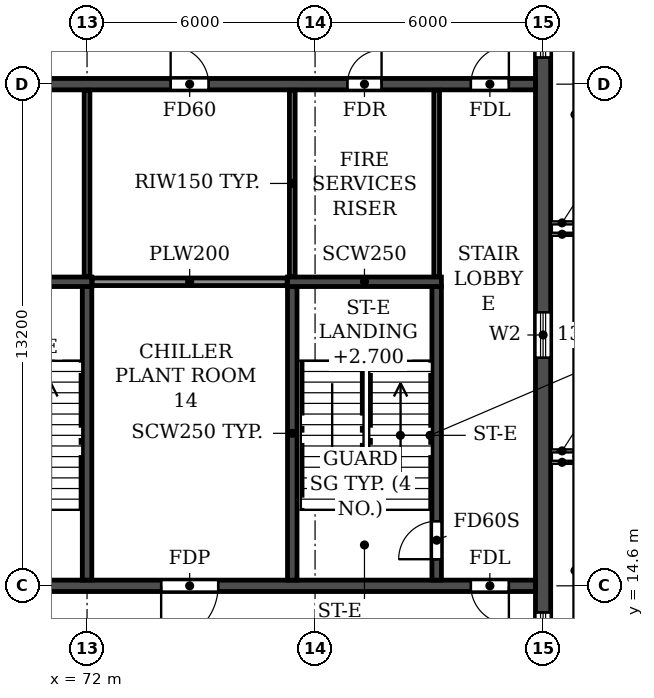
"""IFC4 building model, lengths in metres.
Left out: names, types, materials, properties, quantities, classifications, styles, units other than length and angle.
Written with IfcOpenShell. Run it as: python <this file> out.ifc"""

import sys

from ifc_helpers import new_model, si_unit, direction, frame, frame_2d, origin, place, context, subcontext, project, spatial, rectangle, extrude, element, fill, save


model = new_model("IFC4")
c1 = context("Model", 3, precision=1e-05, world=origin(), true_north=direction((0.0, 1.0)))
c2 = subcontext(c1, "Body", "Model", "MODEL_VIEW")
j1 = project(units=[si_unit("LENGTHUNIT", "METRE"), si_unit("PLANEANGLEUNIT", "RADIAN")], contexts=[c1])
p1 = place(None, origin())
s1 = spatial("IfcSite", under=j1, at=p1, CompositionType="ELEMENT")
p2 = place(p1, origin())
s2 = spatial("IfcBuilding", under=s1, at=p2, CompositionType="ELEMENT")
p3 = place(p2, frame((0.0, 0.0, 267.0)))
s3 = spatial("IfcBuildingStorey", under=s2, at=p3, CompositionType="ELEMENT", Elevation=267.0)
p4 = place(p3, frame((84.0, 4.683, 0.0), z_axis=(0.0, 0.0, 1.0), x_axis=(0.0, 1.0, 0.0)))
e1 = element("IfcWall", 1, at=p4, inside=s3, PredefinedType="SHEAR", context=c2, shape_type="SweptSolid", body=[
    extrude(rectangle(XDim=31.834, YDim=0.4, at=frame_2d((15.917, 0.0))), origin(), (0.0, 0.0, 1.0), 5.15),
])
p5 = place(p4, frame((23.817, 0.0, 0.9)))
e2 = element("IfcOpeningElement", 2, at=p5, cuts=e1, PredefinedType="OPENING", context=c2, shape_type="SweptSolid", body=[
    extrude(rectangle(XDim=1.2, YDim=1.5, at=frame_2d((0.6, 0.75))), frame((0.0, 0.21, 0.0), z_axis=(0.0, -1.0, 0.0), x_axis=(1.0, 0.0, 0.0)), (0.0, 0.0, 1.0), 0.42),
])
p6 = place(p4, frame((8.017, 0.0, 0.9)))
e3 = element("IfcOpeningElement", 3, at=p6, cuts=e1, PredefinedType="OPENING", context=c2, shape_type="SweptSolid", body=[
    extrude(rectangle(XDim=1.2, YDim=1.5, at=frame_2d((0.6, 0.75))), frame((0.0, 0.21, 0.0), z_axis=(0.0, -1.0, 0.0), x_axis=(1.0, 0.0, 0.0)), (0.0, 0.0, 1.0), 0.42),
])
p7 = place(p4, frame((15.917, 0.0, 0.9)))
e4 = element("IfcOpeningElement", 4, at=p7, cuts=e1, PredefinedType="OPENING", context=c2, shape_type="SweptSolid", body=[
    extrude(rectangle(XDim=1.2, YDim=1.5, at=frame_2d((0.6, 0.75))), frame((0.0, 0.21, 0.0), z_axis=(0.0, -1.0, 0.0), x_axis=(1.0, 0.0, 0.0)), (0.0, 0.0, 1.0), 0.42),
])
p8 = place(p3, frame((18.2, 14.6, 0.0), z_axis=(0.0, 0.0, 1.0), x_axis=(1.0, 0.0, 0.0)))
e5 = element("IfcWall", 5, at=p8, inside=s3, PredefinedType="SOLIDWALL", context=c2, shape_type="SweptSolid", body=[
    extrude(rectangle(XDim=65.6, YDim=0.3, at=frame_2d((32.8, 0.0))), origin(), (0.0, 0.0, 1.0), 5.15),
])
p9 = place(p8, frame((0.7, 0.0, 0.0)))
e6 = element("IfcOpeningElement", 6, at=p9, cuts=e5, PredefinedType="OPENING", context=c2, shape_type="SweptSolid", body=[
    extrude(rectangle(XDim=1.0, YDim=2.1, at=frame_2d((0.5, 1.05))), frame((0.0, 0.16, 0.0), z_axis=(0.0, -1.0, 0.0), x_axis=(1.0, 0.0, 0.0)), (0.0, 0.0, 1.0), 0.32),
])
p10 = place(p8, frame((8.35, 0.0, 0.0)))
e7 = element("IfcOpeningElement", 7, at=p10, cuts=e5, PredefinedType="OPENING", context=c2, shape_type="SweptSolid", body=[
    extrude(rectangle(XDim=1.5, YDim=2.1, at=frame_2d((0.75, 1.05))), frame((0.0, 0.16, 0.0), z_axis=(0.0, -1.0, 0.0), x_axis=(1.0, 0.0, 0.0)), (0.0, 0.0, 1.0), 0.32),
])
p11 = place(p8, frame((13.2, 0.0, 0.0)))
e8 = element("IfcOpeningElement", 8, at=p11, cuts=e5, PredefinedType="OPENING", context=c2, shape_type="SweptSolid", body=[
    extrude(rectangle(XDim=1.0, YDim=2.1, at=frame_2d((0.5, 1.05))), frame((0.0, 0.16, 0.0), z_axis=(0.0, -1.0, 0.0), x_axis=(1.0, 0.0, 0.0)), (0.0, 0.0, 1.0), 0.32),
])
p12 = place(p8, frame((27.1, 0.0, 0.0)))
e9 = element("IfcOpeningElement", 9, at=p12, cuts=e5, PredefinedType="OPENING", context=c2, shape_type="SweptSolid", body=[
    extrude(rectangle(XDim=1.0, YDim=2.1, at=frame_2d((0.5, 1.05))), frame((0.0, 0.16, 0.0), z_axis=(0.0, -1.0, 0.0), x_axis=(1.0, 0.0, 0.0)), (0.0, 0.0, 1.0), 0.32),
])
p13 = place(p8, frame((32.3, 0.0, 0.0)))
e10 = element("IfcOpeningElement", 10, at=p13, cuts=e5, PredefinedType="OPENING", context=c2, shape_type="SweptSolid", body=[
    extrude(rectangle(XDim=1.0, YDim=2.1, at=frame_2d((0.5, 1.05))), frame((0.0, 0.16, 0.0), z_axis=(0.0, -1.0, 0.0), x_axis=(1.0, 0.0, 0.0)), (0.0, 0.0, 1.0), 0.32),
])
p14 = place(p8, frame((34.9, 0.0, 0.0)))
e11 = element("IfcOpeningElement", 11, at=p14, cuts=e5, PredefinedType="OPENING", context=c2, shape_type="SweptSolid", body=[
    extrude(rectangle(XDim=1.0, YDim=2.1, at=frame_2d((0.5, 1.05))), frame((0.0, 0.16, 0.0), z_axis=(0.0, -1.0, 0.0), x_axis=(1.0, 0.0, 0.0)), (0.0, 0.0, 1.0), 0.32),
])
p15 = place(p8, frame((38.8, 0.0, 0.0)))
e12 = element("IfcOpeningElement", 12, at=p15, cuts=e5, PredefinedType="OPENING", context=c2, shape_type="SweptSolid", body=[
    extrude(rectangle(XDim=1.0, YDim=2.1, at=frame_2d((0.5, 1.05))), frame((0.0, 0.16, 0.0), z_axis=(0.0, -1.0, 0.0), x_axis=(1.0, 0.0, 0.0)), (0.0, 0.0, 1.0), 0.32),
])
p16 = place(p8, frame((51.4, 0.0, 0.0)))
e13 = element("IfcOpeningElement", 13, at=p16, cuts=e5, PredefinedType="OPENING", context=c2, shape_type="SweptSolid", body=[
    extrude(rectangle(XDim=1.0, YDim=2.1, at=frame_2d((0.5, 1.05))), frame((0.0, 0.16, 0.0), z_axis=(0.0, -1.0, 0.0), x_axis=(1.0, 0.0, 0.0)), (0.0, 0.0, 1.0), 0.32),
])
p17 = place(p8, frame((55.75, 0.0, 0.0)))
e14 = element("IfcOpeningElement", 14, at=p17, cuts=e5, PredefinedType="OPENING", context=c2, shape_type="SweptSolid", body=[
    extrude(rectangle(XDim=1.5, YDim=2.1, at=frame_2d((0.75, 1.05))), frame((0.0, 0.16, 0.0), z_axis=(0.0, -1.0, 0.0), x_axis=(1.0, 0.0, 0.0)), (0.0, 0.0, 1.0), 0.32),
])
p18 = place(p8, frame((63.9, 0.0, 0.0)))
e15 = element("IfcOpeningElement", 15, at=p18, cuts=e5, PredefinedType="OPENING", context=c2, shape_type="SweptSolid", body=[
    extrude(rectangle(XDim=1.0, YDim=2.1, at=frame_2d((0.5, 1.05))), frame((0.0, 0.16, 0.0), z_axis=(0.0, -1.0, 0.0), x_axis=(1.0, 0.0, 0.0)), (0.0, 0.0, 1.0), 0.32),
])
p19 = place(p3, frame((18.2, 27.8, 0.0), z_axis=(0.0, 0.0, 1.0), x_axis=(1.0, 0.0, 0.0)))
e16 = element("IfcWall", 16, at=p19, inside=s3, PredefinedType="SOLIDWALL", context=c2, shape_type="SweptSolid", body=[
    extrude(rectangle(XDim=65.6, YDim=0.3, at=frame_2d((32.8, 0.0))), origin(), (0.0, 0.0, 1.0), 5.15),
])
p20 = place(p19, frame((0.7, 0.0, 0.0)))
e17 = element("IfcOpeningElement", 17, at=p20, cuts=e16, PredefinedType="OPENING", context=c2, shape_type="SweptSolid", body=[
    extrude(rectangle(XDim=1.0, YDim=2.1, at=frame_2d((0.5, 1.05))), frame((0.0, 0.16, 0.0), z_axis=(0.0, -1.0, 0.0), x_axis=(1.0, 0.0, 0.0)), (0.0, 0.0, 1.0), 0.32),
])
p21 = place(p19, frame((4.05, 0.0, 0.0)))
e18 = element("IfcOpeningElement", 18, at=p21, cuts=e16, PredefinedType="OPENING", context=c2, shape_type="SweptSolid", body=[
    extrude(rectangle(XDim=0.9, YDim=2.1, at=frame_2d((0.45, 1.05))), frame((0.0, 0.16, 0.0), z_axis=(0.0, -1.0, 0.0), x_axis=(1.0, 0.0, 0.0)), (0.0, 0.0, 1.0), 0.32),
])
p22 = place(p19, frame((8.6, 0.0, 0.0)))
e19 = element("IfcOpeningElement", 19, at=p22, cuts=e16, PredefinedType="OPENING", context=c2, shape_type="SweptSolid", body=[
    extrude(rectangle(XDim=1.0, YDim=2.1, at=frame_2d((0.5, 1.05))), frame((0.0, 0.16, 0.0), z_axis=(0.0, -1.0, 0.0), x_axis=(1.0, 0.0, 0.0)), (0.0, 0.0, 1.0), 0.32),
])
p23 = place(p19, frame((13.25, 0.0, 0.0)))
e20 = element("IfcOpeningElement", 20, at=p23, cuts=e16, PredefinedType="OPENING", context=c2, shape_type="SweptSolid", body=[
    extrude(rectangle(XDim=0.9, YDim=2.1, at=frame_2d((0.45, 1.05))), frame((0.0, 0.16, 0.0), z_axis=(0.0, -1.0, 0.0), x_axis=(1.0, 0.0, 0.0)), (0.0, 0.0, 1.0), 0.32),
])
p24 = place(p19, frame((17.7, 0.0, 0.0)))
e21 = element("IfcOpeningElement", 21, at=p24, cuts=e16, PredefinedType="OPENING", context=c2, shape_type="SweptSolid", body=[
    extrude(rectangle(XDim=1.0, YDim=2.1, at=frame_2d((0.5, 1.05))), frame((0.0, 0.16, 0.0), z_axis=(0.0, -1.0, 0.0), x_axis=(1.0, 0.0, 0.0)), (0.0, 0.0, 1.0), 0.32),
])
p25 = place(p19, frame((22.9, 0.0, 0.0)))
e22 = element("IfcOpeningElement", 22, at=p25, cuts=e16, PredefinedType="OPENING", context=c2, shape_type="SweptSolid", body=[
    extrude(rectangle(XDim=1.0, YDim=2.1, at=frame_2d((0.5, 1.05))), frame((0.0, 0.16, 0.0), z_axis=(0.0, -1.0, 0.0), x_axis=(1.0, 0.0, 0.0)), (0.0, 0.0, 1.0), 0.32),
])
p26 = place(p19, frame((29.4, 0.0, 0.0)))
e23 = element("IfcOpeningElement", 23, at=p26, cuts=e16, PredefinedType="OPENING", context=c2, shape_type="SweptSolid", body=[
    extrude(rectangle(XDim=1.0, YDim=2.1, at=frame_2d((0.5, 1.05))), frame((0.0, 0.16, 0.0), z_axis=(0.0, -1.0, 0.0), x_axis=(1.0, 0.0, 0.0)), (0.0, 0.0, 1.0), 0.32),
])
p27 = place(p19, frame((32.3, 0.0, 0.0)))
e24 = element("IfcOpeningElement", 24, at=p27, cuts=e16, PredefinedType="OPENING", context=c2, shape_type="SweptSolid", body=[
    extrude(rectangle(XDim=1.0, YDim=2.1, at=frame_2d((0.5, 1.05))), frame((0.0, 0.16, 0.0), z_axis=(0.0, -1.0, 0.0), x_axis=(1.0, 0.0, 0.0)), (0.0, 0.0, 1.0), 0.32),
])
p28 = place(p19, frame((35.2, 0.0, 0.0)))
e25 = element("IfcOpeningElement", 25, at=p28, cuts=e16, PredefinedType="OPENING", context=c2, shape_type="SweptSolid", body=[
    extrude(rectangle(XDim=1.0, YDim=2.1, at=frame_2d((0.5, 1.05))), frame((0.0, 0.16, 0.0), z_axis=(0.0, -1.0, 0.0), x_axis=(1.0, 0.0, 0.0)), (0.0, 0.0, 1.0), 0.32),
])
p29 = place(p19, frame((37.8, 0.0, 0.0)))
e26 = element("IfcOpeningElement", 26, at=p29, cuts=e16, PredefinedType="OPENING", context=c2, shape_type="SweptSolid", body=[
    extrude(rectangle(XDim=1.0, YDim=2.1, at=frame_2d((0.5, 1.05))), frame((0.0, 0.16, 0.0), z_axis=(0.0, -1.0, 0.0), x_axis=(1.0, 0.0, 0.0)), (0.0, 0.0, 1.0), 0.32),
])
p30 = place(p19, frame((40.4, 0.0, 0.0)))
e27 = element("IfcOpeningElement", 27, at=p30, cuts=e16, PredefinedType="OPENING", context=c2, shape_type="SweptSolid", body=[
    extrude(rectangle(XDim=1.0, YDim=2.1, at=frame_2d((0.5, 1.05))), frame((0.0, 0.16, 0.0), z_axis=(0.0, -1.0, 0.0), x_axis=(1.0, 0.0, 0.0)), (0.0, 0.0, 1.0), 0.32),
])
p31 = place(p19, frame((43.0, 0.0, 0.0)))
e28 = element("IfcOpeningElement", 28, at=p31, cuts=e16, PredefinedType="OPENING", context=c2, shape_type="SweptSolid", body=[
    extrude(rectangle(XDim=1.0, YDim=2.1, at=frame_2d((0.5, 1.05))), frame((0.0, 0.16, 0.0), z_axis=(0.0, -1.0, 0.0), x_axis=(1.0, 0.0, 0.0)), (0.0, 0.0, 1.0), 0.32),
])
p32 = place(p19, frame((46.9, 0.0, 0.0)))
e29 = element("IfcOpeningElement", 29, at=p32, cuts=e16, PredefinedType="OPENING", context=c2, shape_type="SweptSolid", body=[
    extrude(rectangle(XDim=1.0, YDim=2.1, at=frame_2d((0.5, 1.05))), frame((0.0, 0.16, 0.0), z_axis=(0.0, -1.0, 0.0), x_axis=(1.0, 0.0, 0.0)), (0.0, 0.0, 1.0), 0.32),
])
p33 = place(p19, frame((51.45, 0.0, 0.0)))
e30 = element("IfcOpeningElement", 30, at=p33, cuts=e16, PredefinedType="OPENING", context=c2, shape_type="SweptSolid", body=[
    extrude(rectangle(XDim=0.9, YDim=2.1, at=frame_2d((0.45, 1.05))), frame((0.0, 0.16, 0.0), z_axis=(0.0, -1.0, 0.0), x_axis=(1.0, 0.0, 0.0)), (0.0, 0.0, 1.0), 0.32),
])
p34 = place(p19, frame((56.0, 0.0, 0.0)))
e31 = element("IfcOpeningElement", 31, at=p34, cuts=e16, PredefinedType="OPENING", context=c2, shape_type="SweptSolid", body=[
    extrude(rectangle(XDim=1.0, YDim=2.1, at=frame_2d((0.5, 1.05))), frame((0.0, 0.16, 0.0), z_axis=(0.0, -1.0, 0.0), x_axis=(1.0, 0.0, 0.0)), (0.0, 0.0, 1.0), 0.32),
])
p35 = place(p19, frame((60.65, 0.0, 0.0)))
e32 = element("IfcOpeningElement", 32, at=p35, cuts=e16, PredefinedType="OPENING", context=c2, shape_type="SweptSolid", body=[
    extrude(rectangle(XDim=0.9, YDim=2.1, at=frame_2d((0.45, 1.05))), frame((0.0, 0.16, 0.0), z_axis=(0.0, -1.0, 0.0), x_axis=(1.0, 0.0, 0.0)), (0.0, 0.0, 1.0), 0.32),
])
p36 = place(p19, frame((63.9, 0.0, 0.0)))
e33 = element("IfcOpeningElement", 33, at=p36, cuts=e16, PredefinedType="OPENING", context=c2, shape_type="SweptSolid", body=[
    extrude(rectangle(XDim=1.0, YDim=2.1, at=frame_2d((0.5, 1.05))), frame((0.0, 0.16, 0.0), z_axis=(0.0, -1.0, 0.0), x_axis=(1.0, 0.0, 0.0)), (0.0, 0.0, 1.0), 0.32),
])
p37 = place(p3, frame((72.0, 14.75, 0.0), z_axis=(0.0, 0.0, 1.0), x_axis=(0.0, 1.0, 0.0)))
e34 = element("IfcWall", 34, at=p37, inside=s3, PredefinedType="SOLIDWALL", context=c2, shape_type="SweptSolid", body=[
    extrude(rectangle(XDim=7.725, YDim=0.25, at=frame_2d((3.863, 0.0))), origin(), (0.0, 0.0, 1.0), 5.15),
])
p38 = place(p3, frame((68.075, 22.6, 0.0), z_axis=(0.0, 0.0, 1.0), x_axis=(1.0, 0.0, 0.0)))
e35 = element("IfcWall", 35, at=p38, inside=s3, PredefinedType="SOLIDWALL", context=c2, shape_type="SweptSolid", body=[
    extrude(rectangle(XDim=4.05, YDim=0.25, at=frame_2d((2.025, 0.0))), origin(), (0.0, 0.0, 1.0), 5.15),
])
p39 = place(p3, frame((77.4, 14.75, 0.0), z_axis=(0.0, 0.0, 1.0), x_axis=(0.0, 1.0, 0.0)))
e36 = element("IfcWall", 36, at=p39, inside=s3, PredefinedType="SOLIDWALL", context=c2, shape_type="SweptSolid", body=[
    extrude(rectangle(XDim=7.725, YDim=0.25, at=frame_2d((3.863, 0.0))), origin(), (0.0, 0.0, 1.0), 5.15),
])
p40 = place(p3, frame((81.2, 14.75, 0.0), z_axis=(0.0, 0.0, 1.0), x_axis=(0.0, 1.0, 0.0)))
e37 = element("IfcWall", 37, at=p40, inside=s3, PredefinedType="SOLIDWALL", context=c2, shape_type="SweptSolid", body=[
    extrude(rectangle(XDim=7.725, YDim=0.25, at=frame_2d((3.863, 0.0))), origin(), (0.0, 0.0, 1.0), 5.15),
])
p41 = place(p40, frame((0.55, 0.0, 0.0)))
e38 = element("IfcOpeningElement", 38, at=p41, cuts=e37, PredefinedType="OPENING", context=c2, shape_type="SweptSolid", body=[
    extrude(rectangle(XDim=1.0, YDim=2.1, at=frame_2d((0.5, 1.05))), frame((0.0, 0.135, 0.0), z_axis=(0.0, -1.0, 0.0), x_axis=(1.0, 0.0, 0.0)), (0.0, 0.0, 1.0), 0.27),
])
p42 = place(p3, frame((77.275, 22.6, 0.0), z_axis=(0.0, 0.0, 1.0), x_axis=(1.0, 0.0, 0.0)))
e39 = element("IfcWall", 39, at=p42, inside=s3, PredefinedType="SOLIDWALL", context=c2, shape_type="SweptSolid", body=[
    extrude(rectangle(XDim=4.05, YDim=0.25, at=frame_2d((2.025, 0.0))), origin(), (0.0, 0.0, 1.0), 5.15),
])
p43 = place(p3, frame((72.135, 22.6, 0.0), z_axis=(0.0, 0.0, 1.0), x_axis=(1.0, 0.0, 0.0)))
e40 = element("IfcWall", 40, at=p43, inside=s3, PredefinedType="PARTITIONING", context=c2, shape_type="SweptSolid", body=[
    extrude(rectangle(XDim=5.13, YDim=0.2, at=frame_2d((2.565, 0.0))), origin(), (0.0, 0.0, 1.0), 5.15),
])
for number, where, z_axis, x_axis in (
    (41, (72.0, 22.735, 0.0), (0.0, 0.0, 1.0), (0.0, 1.0, 0.0)),
    (42, (77.4, 22.735, 0.0), (0.0, 0.0, 1.0), (0.0, 1.0, 0.0)),
    (43, (81.2, 22.735, 0.0), (0.0, 0.0, 1.0), (0.0, 1.0, 0.0)),
):
    element("IfcWall", number, at=place(p3, frame(where, z_axis=z_axis, x_axis=x_axis)), inside=s3, PredefinedType="PARTITIONING", context=c2, shape_type="SweptSolid", body=[
        extrude(rectangle(XDim=4.905, YDim=0.15, at=frame_2d((2.452, 0.0))), origin(), (0.0, 0.0, 1.0), 5.15),
    ])
p44 = place(p5, origin())
e44 = element("IfcWindow", 44, at=p44, inside=s3, PartitioningType="SINGLE_PANEL", PredefinedType="WINDOW", context=c2, shape_type="SweptSolid", body=[
    extrude(rectangle(XDim=1.2, YDim=1.5, at=frame_2d((0.6, 0.75))), frame((0.0, 0.03, 0.0), z_axis=(0.0, -1.0, 0.0), x_axis=(1.0, 0.0, 0.0)), (0.0, 0.0, 1.0), 0.06),
])
fill(e2, e44)
p45 = place(p6, origin())
e45 = element("IfcWindow", 45, at=p45, inside=s3, PartitioningType="SINGLE_PANEL", PredefinedType="WINDOW", context=c2, shape_type="SweptSolid", body=[
    extrude(rectangle(XDim=1.2, YDim=1.5, at=frame_2d((0.6, 0.75))), frame((0.0, 0.03, 0.0), z_axis=(0.0, -1.0, 0.0), x_axis=(1.0, 0.0, 0.0)), (0.0, 0.0, 1.0), 0.06),
])
fill(e3, e45)
p46 = place(p7, origin())
e46 = element("IfcWindow", 46, at=p46, inside=s3, PartitioningType="SINGLE_PANEL", PredefinedType="WINDOW", context=c2, shape_type="SweptSolid", body=[
    extrude(rectangle(XDim=1.2, YDim=1.5, at=frame_2d((0.6, 0.75))), frame((0.0, 0.03, 0.0), z_axis=(0.0, -1.0, 0.0), x_axis=(1.0, 0.0, 0.0)), (0.0, 0.0, 1.0), 0.06),
])
fill(e4, e46)
p47 = place(p34, origin())
e47 = element("IfcDoor", 47, at=p47, inside=s3, OperationType="SINGLE_SWING_LEFT", PredefinedType="DOOR", context=c2, shape_type="SweptSolid", body=[
    extrude(rectangle(XDim=1.0, YDim=2.1, at=frame_2d((0.5, 1.05))), frame((0.0, 0.025, 0.0), z_axis=(0.0, -1.0, 0.0), x_axis=(1.0, 0.0, 0.0)), (0.0, 0.0, 1.0), 0.05),
])
fill(e31, e47)
p48 = place(p35, origin())
e48 = element("IfcDoor", 48, at=p48, inside=s3, OperationType="SINGLE_SWING_RIGHT", PredefinedType="DOOR", context=c2, shape_type="SweptSolid", body=[
    extrude(rectangle(XDim=0.9, YDim=2.1, at=frame_2d((0.45, 1.05))), frame((0.0, 0.025, 0.0), z_axis=(0.0, -1.0, 0.0), x_axis=(1.0, 0.0, 0.0)), (0.0, 0.0, 1.0), 0.05),
])
fill(e32, e48)
p49 = place(p36, origin())
e49 = element("IfcDoor", 49, at=p49, inside=s3, OperationType="SINGLE_SWING_RIGHT", PredefinedType="DOOR", context=c2, shape_type="SweptSolid", body=[
    extrude(rectangle(XDim=1.0, YDim=2.1, at=frame_2d((0.5, 1.05))), frame((0.0, 0.025, 0.0), z_axis=(0.0, -1.0, 0.0), x_axis=(1.0, 0.0, 0.0)), (0.0, 0.0, 1.0), 0.05),
])
fill(e33, e49)
p50 = place(p17, frame((1.5, 0.0, 0.0), z_axis=(0.0, 0.0, 1.0), x_axis=(-1.0, 0.0, 0.0)))
e50 = element("IfcDoor", 50, at=p50, inside=s3, OperationType="DOUBLE_DOOR_SINGLE_SWING", PredefinedType="DOOR", context=c2, shape_type="SweptSolid", body=[
    extrude(rectangle(XDim=1.5, YDim=2.1, at=frame_2d((0.75, 1.05))), frame((0.0, 0.025, 0.0), z_axis=(0.0, -1.0, 0.0), x_axis=(1.0, 0.0, 0.0)), (0.0, 0.0, 1.0), 0.05),
])
fill(e14, e50)
p51 = place(p18, frame((1.0, 0.0, 0.0), z_axis=(0.0, 0.0, 1.0), x_axis=(-1.0, 0.0, 0.0)))
e51 = element("IfcDoor", 51, at=p51, inside=s3, OperationType="SINGLE_SWING_LEFT", PredefinedType="DOOR", context=c2, shape_type="SweptSolid", body=[
    extrude(rectangle(XDim=1.0, YDim=2.1, at=frame_2d((0.5, 1.05))), frame((0.0, 0.025, 0.0), z_axis=(0.0, -1.0, 0.0), x_axis=(1.0, 0.0, 0.0)), (0.0, 0.0, 1.0), 0.05),
])
fill(e15, e51)
p52 = place(p41, origin())
e52 = element("IfcDoor", 52, at=p52, inside=s3, OperationType="SINGLE_SWING_LEFT", PredefinedType="DOOR", context=c2, shape_type="SweptSolid", body=[
    extrude(rectangle(XDim=1.0, YDim=2.1, at=frame_2d((0.5, 1.05))), frame((0.0, 0.025, 0.0), z_axis=(0.0, -1.0, 0.0), x_axis=(1.0, 0.0, 0.0)), (0.0, 0.0, 1.0), 0.05),
])
fill(e38, e52)
save(model, sys.argv[1])
